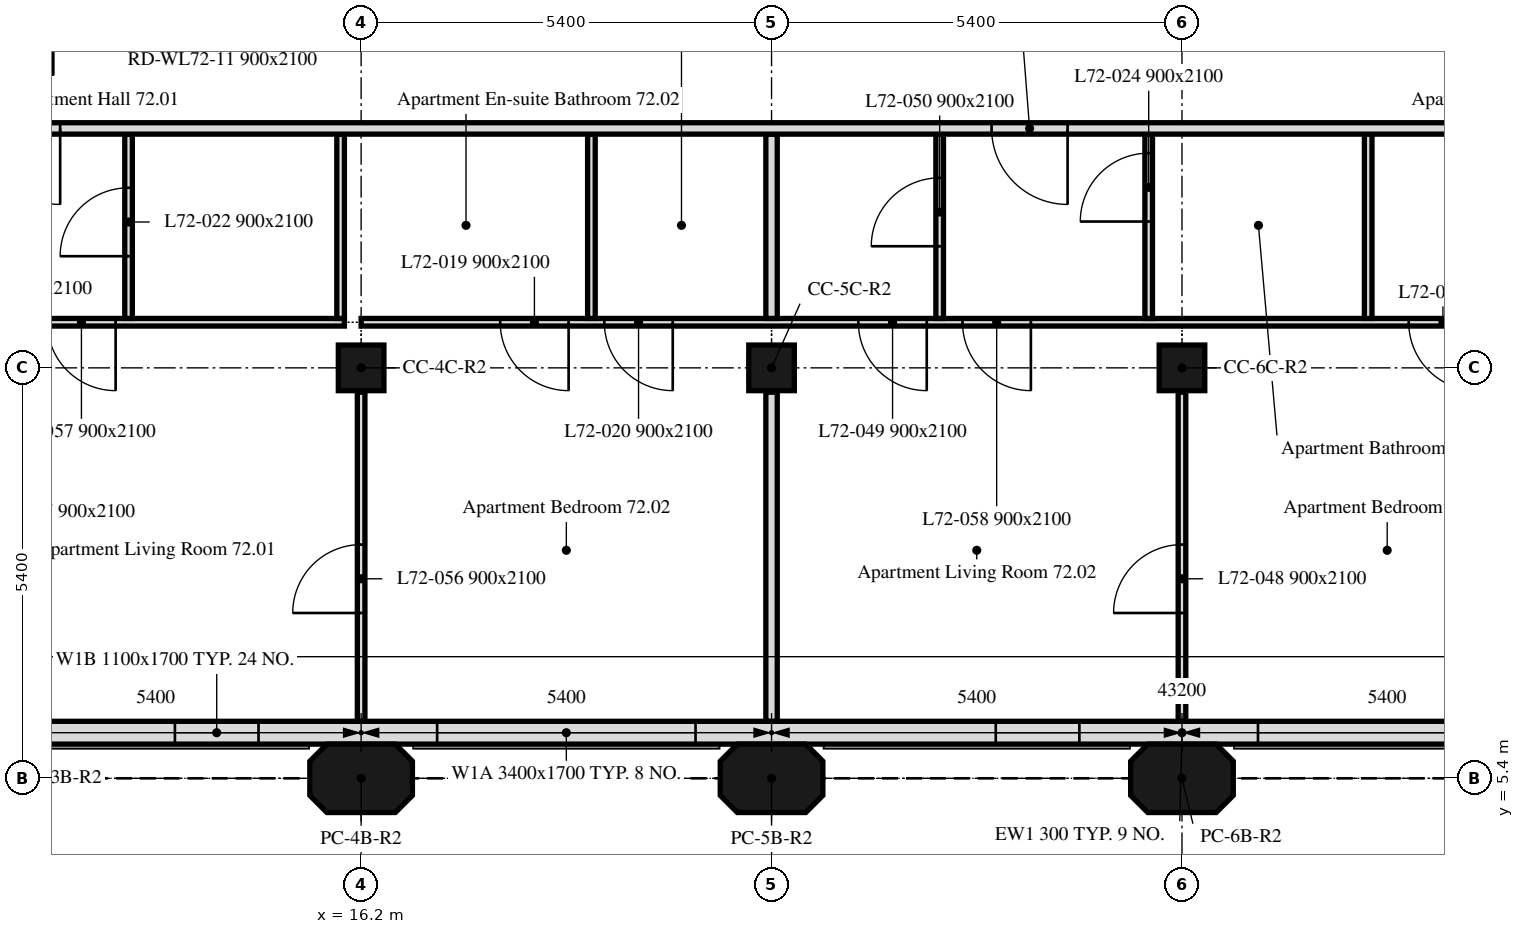
"""IFC4 building model, lengths in metres.
Left out: names, types, materials, properties, quantities, classifications, styles, units other than length and angle.
Written with IfcOpenShell. Run it as: python <this file> out.ifc"""

import sys

from ifc_helpers import new_model, si_unit, direction, frame, frame_2d, origin, origin_2d, place, context, subcontext, project, spatial, polyline, rectangle, outline, extrude, element, fill, save


model = new_model("IFC4")
c1 = context("Model", 3, precision=1e-05, world=origin(), true_north=direction((0.0, 1.0)))
c2 = subcontext(c1, "Body", "Model", "MODEL_VIEW")
j1 = project(units=[si_unit("LENGTHUNIT", "METRE"), si_unit("PLANEANGLEUNIT", "RADIAN")], contexts=[c1])
p1 = place(None, origin())
s1 = spatial("IfcSite", under=j1, at=p1, CompositionType="ELEMENT")
p2 = place(p1, origin())
s2 = spatial("IfcBuilding", under=s1, at=p2, CompositionType="ELEMENT")
p3 = place(p2, frame((0.0, 0.0, 291.7)))
s3 = spatial("IfcBuildingStorey", under=s2, at=p3, CompositionType="ELEMENT", Elevation=291.7)
for number, where, z_axis, x_axis in (
    (1, (16.2, 5.4, 0.0), (0.0, 0.0, 1.0), (1.0, 0.0, 0.0)),
    (2, (21.6, 5.4, 0.0), (0.0, 0.0, 1.0), (1.0, 0.0, 0.0)),
    (3, (27.0, 5.4, 0.0), (0.0, 0.0, 1.0), (1.0, 0.0, 0.0)),
):
    element("IfcColumn", number, at=place(p3, frame(where, z_axis=z_axis, x_axis=x_axis)), inside=s3, PredefinedType="COLUMN", context=c2, shape_type="SweptSolid", body=[
        extrude(outline(polyline([(-0.45, -0.45), (0.45, -0.45), (0.675, -0.225), (0.675, 0.225), (0.45, 0.45), (-0.45, 0.45), (-0.675, 0.225), (-0.675, -0.225), (-0.45, -0.45)])), origin(), (0.0, 0.0, 1.0), 3.0),
    ])
for number, where, z_axis, x_axis in (
    (4, (16.2, 10.8, 0.0), (0.0, 0.0, 1.0), (1.0, 0.0, 0.0)),
    (5, (21.6, 10.8, 0.0), (0.0, 0.0, 1.0), (1.0, 0.0, 0.0)),
    (6, (27.0, 10.8, 0.0), (0.0, 0.0, 1.0), (1.0, 0.0, 0.0)),
):
    element("IfcColumn", number, at=place(p3, frame(where, z_axis=z_axis, x_axis=x_axis)), inside=s3, PredefinedType="COLUMN", context=c2, shape_type="SweptSolid", body=[
        extrude(rectangle(XDim=0.6, YDim=0.6, at=origin_2d()), origin(), (0.0, 0.0, 1.0), 3.0),
    ])
p4 = place(p3, frame((10.986, 6.0, 0.0), z_axis=(0.0, 0.0, 1.0), x_axis=(1.0, 0.0, 0.0)))
e7 = element("IfcWall", 7, at=p4, inside=s3, PredefinedType="SOLIDWALL", context=c2, shape_type="SweptSolid", body=[
    extrude(rectangle(XDim=32.027, YDim=0.3, at=frame_2d((16.014, 0.0))), origin(), (0.0, 0.0, 1.0), 3.0),
])
p5 = place(p4, frame((2.764, 0.0, 0.9)))
e8 = element("IfcOpeningElement", 8, at=p5, cuts=e7, PredefinedType="OPENING", context=c2, shape_type="SweptSolid", body=[
    extrude(rectangle(XDim=1.1, YDim=1.7, at=frame_2d((0.55, 0.85))), frame((0.0, 0.16, 0.0), z_axis=(0.0, -1.0, 0.0), x_axis=(1.0, 0.0, 0.0)), (0.0, 0.0, 1.0), 0.32),
])
p6 = place(p4, frame((6.214, 0.0, 0.9)))
e9 = element("IfcOpeningElement", 9, at=p6, cuts=e7, PredefinedType="OPENING", context=c2, shape_type="SweptSolid", body=[
    extrude(rectangle(XDim=3.4, YDim=1.7, at=frame_2d((1.7, 0.85))), frame((0.0, 0.16, 0.0), z_axis=(0.0, -1.0, 0.0), x_axis=(1.0, 0.0, 0.0)), (0.0, 0.0, 1.0), 0.32),
])
p7 = place(p4, frame((13.564, 0.0, 0.9)))
e10 = element("IfcOpeningElement", 10, at=p7, cuts=e7, PredefinedType="OPENING", context=c2, shape_type="SweptSolid", body=[
    extrude(rectangle(XDim=1.1, YDim=1.7, at=frame_2d((0.55, 0.85))), frame((0.0, 0.16, 0.0), z_axis=(0.0, -1.0, 0.0), x_axis=(1.0, 0.0, 0.0)), (0.0, 0.0, 1.0), 0.32),
])
p8 = place(p4, frame((17.014, 0.0, 0.9)))
e11 = element("IfcOpeningElement", 11, at=p8, cuts=e7, PredefinedType="OPENING", context=c2, shape_type="SweptSolid", body=[
    extrude(rectangle(XDim=3.4, YDim=1.7, at=frame_2d((1.7, 0.85))), frame((0.0, 0.16, 0.0), z_axis=(0.0, -1.0, 0.0), x_axis=(1.0, 0.0, 0.0)), (0.0, 0.0, 1.0), 0.32),
])
p9 = place(p4, frame((24.364, 0.0, 0.9)))
e12 = element("IfcOpeningElement", 12, at=p9, cuts=e7, PredefinedType="OPENING", context=c2, shape_type="SweptSolid", body=[
    extrude(rectangle(XDim=1.1, YDim=1.7, at=frame_2d((0.55, 0.85))), frame((0.0, 0.16, 0.0), z_axis=(0.0, -1.0, 0.0), x_axis=(1.0, 0.0, 0.0)), (0.0, 0.0, 1.0), 0.32),
])
p10 = place(p4, frame((27.814, 0.0, 0.9)))
e13 = element("IfcOpeningElement", 13, at=p10, cuts=e7, PredefinedType="OPENING", context=c2, shape_type="SweptSolid", body=[
    extrude(rectangle(XDim=3.4, YDim=1.7, at=frame_2d((1.7, 0.85))), frame((0.0, 0.16, 0.0), z_axis=(0.0, -1.0, 0.0), x_axis=(1.0, 0.0, 0.0)), (0.0, 0.0, 1.0), 0.32),
])
p11 = place(p3, frame((15.98, 11.4, 0.0), z_axis=(0.0, 0.0, 1.0), x_axis=(-1.0, 0.0, 0.0)))
e14 = element("IfcWall", 14, at=p11, inside=s3, PredefinedType="PARTITIONING", context=c2, shape_type="SweptSolid", body=[
    extrude(rectangle(XDim=9.829, YDim=0.1, at=frame_2d((4.915, 0.0))), origin(), (0.0, 0.0, 1.0), 3.0),
])
p12 = place(p11, frame((7.88, 0.0, 0.0)))
e15 = element("IfcOpeningElement", 15, at=p12, cuts=e14, PredefinedType="OPENING", context=c2, shape_type="SweptSolid", body=[
    extrude(rectangle(XDim=0.9, YDim=2.1, at=frame_2d((0.45, 1.05))), frame((0.0, 0.05, 0.0), z_axis=(0.0, -1.0, 0.0), x_axis=(1.0, 0.0, 0.0)), (0.0, 0.0, 1.0), 0.1),
])
p13 = place(p11, frame((3.01, 0.0, 0.0)))
e16 = element("IfcOpeningElement", 16, at=p13, cuts=e14, PredefinedType="OPENING", context=c2, shape_type="SweptSolid", body=[
    extrude(rectangle(XDim=0.9, YDim=2.1, at=frame_2d((0.45, 1.05))), frame((0.0, 0.05, 0.0), z_axis=(0.0, -1.0, 0.0), x_axis=(1.0, 0.0, 0.0)), (0.0, 0.0, 1.0), 0.1),
])
p14 = place(p3, frame((16.2, 6.151, 0.0), z_axis=(0.0, 0.0, 1.0), x_axis=(0.0, 1.0, 0.0)))
e17 = element("IfcWall", 17, at=p14, inside=s3, PredefinedType="PARTITIONING", context=c2, shape_type="SweptSolid", body=[
    extrude(rectangle(XDim=4.329, YDim=0.1, at=frame_2d((2.165, 0.0))), origin(), (0.0, 0.0, 1.0), 3.0),
])
p15 = place(p14, frame((1.424, 0.0, 0.0)))
e18 = element("IfcOpeningElement", 18, at=p15, cuts=e17, PredefinedType="OPENING", context=c2, shape_type="SweptSolid", body=[
    extrude(rectangle(XDim=0.9, YDim=2.1, at=frame_2d((0.45, 1.05))), frame((0.0, 0.05, 0.0), z_axis=(0.0, -1.0, 0.0), x_axis=(1.0, 0.0, 0.0)), (0.0, 0.0, 1.0), 0.1),
])
p16 = place(p3, frame((21.6, 6.151, 0.0), z_axis=(0.0, 0.0, 1.0), x_axis=(0.0, 1.0, 0.0)))
e19 = element("IfcWall", 19, at=p16, inside=s3, PredefinedType="PARTITIONING", context=c2, shape_type="SweptSolid", body=[
    extrude(rectangle(XDim=4.329, YDim=0.15, at=frame_2d((2.165, 0.0))), origin(), (0.0, 0.0, 1.0), 3.0),
])
p17 = place(p3, frame((37.8, 11.4, 0.0), z_axis=(0.0, 0.0, 1.0), x_axis=(-1.0, 0.0, 0.0)))
e20 = element("IfcWall", 20, at=p17, inside=s3, PredefinedType="PARTITIONING", context=c2, shape_type="SweptSolid", body=[
    extrude(rectangle(XDim=21.6, YDim=0.1, at=frame_2d((10.8, 0.0))), origin(), (0.0, 0.0, 1.0), 3.0),
])
p18 = place(p17, frame((18.87, 0.0, 0.0)))
e21 = element("IfcOpeningElement", 21, at=p18, cuts=e20, PredefinedType="OPENING", context=c2, shape_type="SweptSolid", body=[
    extrude(rectangle(XDim=0.9, YDim=2.1, at=frame_2d((0.45, 1.05))), frame((0.0, 0.05, 0.0), z_axis=(0.0, -1.0, 0.0), x_axis=(1.0, 0.0, 0.0)), (0.0, 0.0, 1.0), 0.1),
])
p19 = place(p17, frame((17.5, 0.0, 0.0)))
e22 = element("IfcOpeningElement", 22, at=p19, cuts=e20, PredefinedType="OPENING", context=c2, shape_type="SweptSolid", body=[
    extrude(rectangle(XDim=0.9, YDim=2.1, at=frame_2d((0.45, 1.05))), frame((0.0, 0.05, 0.0), z_axis=(0.0, -1.0, 0.0), x_axis=(1.0, 0.0, 0.0)), (0.0, 0.0, 1.0), 0.1),
])
p20 = place(p17, frame((6.917, 0.0, 0.0)))
e23 = element("IfcOpeningElement", 23, at=p20, cuts=e20, PredefinedType="OPENING", context=c2, shape_type="SweptSolid", body=[
    extrude(rectangle(XDim=0.9, YDim=2.1, at=frame_2d((0.45, 1.05))), frame((0.0, 0.05, 0.0), z_axis=(0.0, -1.0, 0.0), x_axis=(1.0, 0.0, 0.0)), (0.0, 0.0, 1.0), 0.1),
])
p21 = place(p17, frame((3.15, 0.0, 0.0)))
e24 = element("IfcOpeningElement", 24, at=p21, cuts=e20, PredefinedType="OPENING", context=c2, shape_type="SweptSolid", body=[
    extrude(rectangle(XDim=0.9, YDim=2.1, at=frame_2d((0.45, 1.05))), frame((0.0, 0.05, 0.0), z_axis=(0.0, -1.0, 0.0), x_axis=(1.0, 0.0, 0.0)), (0.0, 0.0, 1.0), 0.1),
])
p22 = place(p17, frame((14.158, 0.0, 0.0)))
e25 = element("IfcOpeningElement", 25, at=p22, cuts=e20, PredefinedType="OPENING", context=c2, shape_type="SweptSolid", body=[
    extrude(rectangle(XDim=0.9, YDim=2.1, at=frame_2d((0.45, 1.05))), frame((0.0, 0.05, 0.0), z_axis=(0.0, -1.0, 0.0), x_axis=(1.0, 0.0, 0.0)), (0.0, 0.0, 1.0), 0.1),
])
p23 = place(p17, frame((12.788, 0.0, 0.0)))
e26 = element("IfcOpeningElement", 26, at=p23, cuts=e20, PredefinedType="OPENING", context=c2, shape_type="SweptSolid", body=[
    extrude(rectangle(XDim=0.9, YDim=2.1, at=frame_2d((0.45, 1.05))), frame((0.0, 0.05, 0.0), z_axis=(0.0, -1.0, 0.0), x_axis=(1.0, 0.0, 0.0)), (0.0, 0.0, 1.0), 0.1),
])
p24 = place(p3, frame((13.14, 11.45, 0.0), z_axis=(0.0, 0.0, 1.0), x_axis=(0.0, 1.0, 0.0)))
e27 = element("IfcWall", 27, at=p24, inside=s3, PredefinedType="PARTITIONING", context=c2, shape_type="SweptSolid", body=[
    extrude(rectangle(XDim=2.425, YDim=0.1, at=frame_2d((1.212, 0.0))), origin(), (0.0, 0.0, 1.0), 3.0),
])
p25 = place(p24, frame((0.819, 0.0, 0.0)))
e28 = element("IfcOpeningElement", 28, at=p25, cuts=e27, PredefinedType="OPENING", context=c2, shape_type="SweptSolid", body=[
    extrude(rectangle(XDim=0.9, YDim=2.1, at=frame_2d((0.45, 1.05))), frame((0.0, 0.05, 0.0), z_axis=(0.0, -1.0, 0.0), x_axis=(1.0, 0.0, 0.0)), (0.0, 0.0, 1.0), 0.1),
])
for number, where, z_axis, x_axis in (
    (29, (15.93, 11.45, 0.0), (0.0, 0.0, 1.0), (0.0, 1.0, 0.0)),
    (30, (19.23, 11.45, 0.0), (0.0, 0.0, 1.0), (0.0, 1.0, 0.0)),
):
    element("IfcWall", number, at=place(p3, frame(where, z_axis=z_axis, x_axis=x_axis)), inside=s3, PredefinedType="PARTITIONING", context=c2, shape_type="SweptSolid", body=[
        extrude(rectangle(XDim=2.425, YDim=0.1, at=frame_2d((1.212, 0.0))), origin(), (0.0, 0.0, 1.0), 3.0),
    ])
p26 = place(p3, frame((21.6, 11.45, 0.0), z_axis=(0.0, 0.0, 1.0), x_axis=(0.0, 1.0, 0.0)))
e31 = element("IfcWall", 31, at=p26, inside=s3, PredefinedType="PARTITIONING", context=c2, shape_type="SweptSolid", body=[
    extrude(rectangle(XDim=2.425, YDim=0.15, at=frame_2d((1.212, 0.0))), origin(), (0.0, 0.0, 1.0), 3.0),
])
p27 = place(p3, frame((27.0, 6.151, 0.0), z_axis=(0.0, 0.0, 1.0), x_axis=(0.0, 1.0, 0.0)))
e32 = element("IfcWall", 32, at=p27, inside=s3, PredefinedType="PARTITIONING", context=c2, shape_type="SweptSolid", body=[
    extrude(rectangle(XDim=4.329, YDim=0.1, at=frame_2d((2.165, 0.0))), origin(), (0.0, 0.0, 1.0), 3.0),
])
p28 = place(p27, frame((1.424, 0.0, 0.0)))
e33 = element("IfcOpeningElement", 33, at=p28, cuts=e32, PredefinedType="OPENING", context=c2, shape_type="SweptSolid", body=[
    extrude(rectangle(XDim=0.9, YDim=2.1, at=frame_2d((0.45, 1.05))), frame((0.0, 0.05, 0.0), z_axis=(0.0, -1.0, 0.0), x_axis=(1.0, 0.0, 0.0)), (0.0, 0.0, 1.0), 0.1),
])
p29 = place(p3, frame((23.812, 11.45, 0.0), z_axis=(0.0, 0.0, 1.0), x_axis=(0.0, 1.0, 0.0)))
e34 = element("IfcWall", 34, at=p29, inside=s3, PredefinedType="PARTITIONING", context=c2, shape_type="SweptSolid", body=[
    extrude(rectangle(XDim=2.425, YDim=0.1, at=frame_2d((1.212, 0.0))), origin(), (0.0, 0.0, 1.0), 3.0),
])
p30 = place(p29, frame((0.95, 0.0, 0.0)))
e35 = element("IfcOpeningElement", 35, at=p30, cuts=e34, PredefinedType="OPENING", context=c2, shape_type="SweptSolid", body=[
    extrude(rectangle(XDim=0.9, YDim=2.1, at=frame_2d((0.45, 1.05))), frame((0.0, 0.05, 0.0), z_axis=(0.0, -1.0, 0.0), x_axis=(1.0, 0.0, 0.0)), (0.0, 0.0, 1.0), 0.1),
])
p31 = place(p3, frame((26.562, 11.45, 0.0), z_axis=(0.0, 0.0, 1.0), x_axis=(0.0, 1.0, 0.0)))
e36 = element("IfcWall", 36, at=p31, inside=s3, PredefinedType="PARTITIONING", context=c2, shape_type="SweptSolid", body=[
    extrude(rectangle(XDim=2.425, YDim=0.1, at=frame_2d((1.212, 0.0))), origin(), (0.0, 0.0, 1.0), 3.0),
])
p32 = place(p31, frame((1.275, 0.0, 0.0)))
e37 = element("IfcOpeningElement", 37, at=p32, cuts=e36, PredefinedType="OPENING", context=c2, shape_type="SweptSolid", body=[
    extrude(rectangle(XDim=0.9, YDim=2.1, at=frame_2d((0.45, 1.05))), frame((0.0, 0.05, 0.0), z_axis=(0.0, -1.0, 0.0), x_axis=(1.0, 0.0, 0.0)), (0.0, 0.0, 1.0), 0.1),
])
p33 = place(p3, frame((29.45, 11.45, 0.0), z_axis=(0.0, 0.0, 1.0), x_axis=(0.0, 1.0, 0.0)))
e38 = element("IfcWall", 38, at=p33, inside=s3, PredefinedType="PARTITIONING", context=c2, shape_type="SweptSolid", body=[
    extrude(rectangle(XDim=2.425, YDim=0.1, at=frame_2d((1.212, 0.0))), origin(), (0.0, 0.0, 1.0), 3.0),
])
p34 = place(p3, frame((47.849, 13.95, 0.0), z_axis=(0.0, 0.0, 1.0), x_axis=(-1.0, 0.0, 0.0)))
e39 = element("IfcWall", 39, at=p34, inside=s3, PredefinedType="PARTITIONING", context=c2, shape_type="SweptSolid", body=[
    extrude(rectangle(XDim=41.698, YDim=0.15, at=frame_2d((20.849, 0.0))), origin(), (0.0, 0.0, 1.0), 3.0),
])
p35 = place(p34, frame((35.609, 0.0, 0.0)))
e40 = element("IfcOpeningElement", 40, at=p35, cuts=e39, PredefinedType="OPENING", context=c2, shape_type="SweptSolid", body=[
    extrude(rectangle(XDim=1.0, YDim=2.1, at=frame_2d((0.5, 1.05))), frame((0.0, 0.075, 0.0), z_axis=(0.0, -1.0, 0.0), x_axis=(1.0, 0.0, 0.0)), (0.0, 0.0, 1.0), 0.15),
])
p36 = place(p34, frame((22.354, 0.0, 0.0)))
e41 = element("IfcOpeningElement", 41, at=p36, cuts=e39, PredefinedType="OPENING", context=c2, shape_type="SweptSolid", body=[
    extrude(rectangle(XDim=1.0, YDim=2.1, at=frame_2d((0.5, 1.05))), frame((0.0, 0.075, 0.0), z_axis=(0.0, -1.0, 0.0), x_axis=(1.0, 0.0, 0.0)), (0.0, 0.0, 1.0), 0.15),
])
p37 = place(p34, frame((8.049, 0.0, 0.0)))
e42 = element("IfcOpeningElement", 42, at=p37, cuts=e39, PredefinedType="OPENING", context=c2, shape_type="SweptSolid", body=[
    extrude(rectangle(XDim=1.0, YDim=2.1, at=frame_2d((0.5, 1.05))), frame((0.0, 0.075, 0.0), z_axis=(0.0, -1.0, 0.0), x_axis=(1.0, 0.0, 0.0)), (0.0, 0.0, 1.0), 0.15),
])
p38 = place(p5, origin())
e43 = element("IfcWindow", 43, at=p38, inside=s3, PartitioningType="SINGLE_PANEL", PredefinedType="WINDOW", context=c2, shape_type="SweptSolid", body=[
    extrude(rectangle(XDim=1.1, YDim=1.7, at=frame_2d((0.55, 0.85))), frame((0.0, 0.03, 0.0), z_axis=(0.0, -1.0, 0.0), x_axis=(1.0, 0.0, 0.0)), (0.0, 0.0, 1.0), 0.06),
])
fill(e8, e43)
p39 = place(p6, origin())
e44 = element("IfcWindow", 44, at=p39, inside=s3, PartitioningType="SINGLE_PANEL", PredefinedType="WINDOW", context=c2, shape_type="SweptSolid", body=[
    extrude(rectangle(XDim=3.4, YDim=1.7, at=frame_2d((1.7, 0.85))), frame((0.0, 0.03, 0.0), z_axis=(0.0, -1.0, 0.0), x_axis=(1.0, 0.0, 0.0)), (0.0, 0.0, 1.0), 0.06),
])
fill(e9, e44)
p40 = place(p7, origin())
e45 = element("IfcWindow", 45, at=p40, inside=s3, PartitioningType="SINGLE_PANEL", PredefinedType="WINDOW", context=c2, shape_type="SweptSolid", body=[
    extrude(rectangle(XDim=1.1, YDim=1.7, at=frame_2d((0.55, 0.85))), frame((0.0, 0.03, 0.0), z_axis=(0.0, -1.0, 0.0), x_axis=(1.0, 0.0, 0.0)), (0.0, 0.0, 1.0), 0.06),
])
fill(e10, e45)
p41 = place(p8, origin())
e46 = element("IfcWindow", 46, at=p41, inside=s3, PartitioningType="SINGLE_PANEL", PredefinedType="WINDOW", context=c2, shape_type="SweptSolid", body=[
    extrude(rectangle(XDim=3.4, YDim=1.7, at=frame_2d((1.7, 0.85))), frame((0.0, 0.03, 0.0), z_axis=(0.0, -1.0, 0.0), x_axis=(1.0, 0.0, 0.0)), (0.0, 0.0, 1.0), 0.06),
])
fill(e11, e46)
p42 = place(p18, origin())
e47 = element("IfcDoor", 47, at=p42, inside=s3, OperationType="SINGLE_SWING_RIGHT", PredefinedType="DOOR", context=c2, shape_type="SweptSolid", body=[
    extrude(rectangle(XDim=0.9, YDim=2.1, at=frame_2d((0.45, 1.05))), frame((0.0, 0.025, 0.0), z_axis=(0.0, -1.0, 0.0), x_axis=(1.0, 0.0, 0.0)), (0.0, 0.0, 1.0), 0.05),
])
fill(e21, e47)
p43 = place(p19, origin())
e48 = element("IfcDoor", 48, at=p43, inside=s3, OperationType="SINGLE_SWING_LEFT", PredefinedType="DOOR", context=c2, shape_type="SweptSolid", body=[
    extrude(rectangle(XDim=0.9, YDim=2.1, at=frame_2d((0.45, 1.05))), frame((0.0, 0.025, 0.0), z_axis=(0.0, -1.0, 0.0), x_axis=(1.0, 0.0, 0.0)), (0.0, 0.0, 1.0), 0.05),
])
fill(e22, e48)
p44 = place(p25, origin())
e49 = element("IfcDoor", 49, at=p44, inside=s3, OperationType="SINGLE_SWING_LEFT", PredefinedType="DOOR", context=c2, shape_type="SweptSolid", body=[
    extrude(rectangle(XDim=0.9, YDim=2.1, at=frame_2d((0.45, 1.05))), frame((0.0, 0.025, 0.0), z_axis=(0.0, -1.0, 0.0), x_axis=(1.0, 0.0, 0.0)), (0.0, 0.0, 1.0), 0.05),
])
fill(e28, e49)
p45 = place(p20, origin())
e50 = element("IfcDoor", 50, at=p45, inside=s3, OperationType="SINGLE_SWING_RIGHT", PredefinedType="DOOR", context=c2, shape_type="SweptSolid", body=[
    extrude(rectangle(XDim=0.9, YDim=2.1, at=frame_2d((0.45, 1.05))), frame((0.0, 0.025, 0.0), z_axis=(0.0, -1.0, 0.0), x_axis=(1.0, 0.0, 0.0)), (0.0, 0.0, 1.0), 0.05),
])
fill(e23, e50)
p46 = place(p32, origin())
e51 = element("IfcDoor", 51, at=p46, inside=s3, OperationType="SINGLE_SWING_LEFT", PredefinedType="DOOR", context=c2, shape_type="SweptSolid", body=[
    extrude(rectangle(XDim=0.9, YDim=2.1, at=frame_2d((0.45, 1.05))), frame((0.0, 0.025, 0.0), z_axis=(0.0, -1.0, 0.0), x_axis=(1.0, 0.0, 0.0)), (0.0, 0.0, 1.0), 0.05),
])
fill(e37, e51)
p47 = place(p28, origin())
e52 = element("IfcDoor", 52, at=p47, inside=s3, OperationType="SINGLE_SWING_LEFT", PredefinedType="DOOR", context=c2, shape_type="SweptSolid", body=[
    extrude(rectangle(XDim=0.9, YDim=2.1, at=frame_2d((0.45, 1.05))), frame((0.0, 0.025, 0.0), z_axis=(0.0, -1.0, 0.0), x_axis=(1.0, 0.0, 0.0)), (0.0, 0.0, 1.0), 0.05),
])
fill(e33, e52)
p48 = place(p22, origin())
e53 = element("IfcDoor", 53, at=p48, inside=s3, OperationType="SINGLE_SWING_LEFT", PredefinedType="DOOR", context=c2, shape_type="SweptSolid", body=[
    extrude(rectangle(XDim=0.9, YDim=2.1, at=frame_2d((0.45, 1.05))), frame((0.0, 0.025, 0.0), z_axis=(0.0, -1.0, 0.0), x_axis=(1.0, 0.0, 0.0)), (0.0, 0.0, 1.0), 0.05),
])
fill(e25, e53)
p49 = place(p30, origin())
e54 = element("IfcDoor", 54, at=p49, inside=s3, OperationType="SINGLE_SWING_LEFT", PredefinedType="DOOR", context=c2, shape_type="SweptSolid", body=[
    extrude(rectangle(XDim=0.9, YDim=2.1, at=frame_2d((0.45, 1.05))), frame((0.0, 0.025, 0.0), z_axis=(0.0, -1.0, 0.0), x_axis=(1.0, 0.0, 0.0)), (0.0, 0.0, 1.0), 0.05),
])
fill(e35, e54)
p50 = place(p15, origin())
e55 = element("IfcDoor", 55, at=p50, inside=s3, OperationType="SINGLE_SWING_RIGHT", PredefinedType="DOOR", context=c2, shape_type="SweptSolid", body=[
    extrude(rectangle(XDim=0.9, YDim=2.1, at=frame_2d((0.45, 1.05))), frame((0.0, 0.025, 0.0), z_axis=(0.0, -1.0, 0.0), x_axis=(1.0, 0.0, 0.0)), (0.0, 0.0, 1.0), 0.05),
])
fill(e18, e55)
p51 = place(p13, origin())
e56 = element("IfcDoor", 56, at=p51, inside=s3, OperationType="SINGLE_SWING_LEFT", PredefinedType="DOOR", context=c2, shape_type="SweptSolid", body=[
    extrude(rectangle(XDim=0.9, YDim=2.1, at=frame_2d((0.45, 1.05))), frame((0.0, 0.025, 0.0), z_axis=(0.0, -1.0, 0.0), x_axis=(1.0, 0.0, 0.0)), (0.0, 0.0, 1.0), 0.05),
])
fill(e16, e56)
p52 = place(p23, origin())
e57 = element("IfcDoor", 57, at=p52, inside=s3, OperationType="SINGLE_SWING_RIGHT", PredefinedType="DOOR", context=c2, shape_type="SweptSolid", body=[
    extrude(rectangle(XDim=0.9, YDim=2.1, at=frame_2d((0.45, 1.05))), frame((0.0, 0.025, 0.0), z_axis=(0.0, -1.0, 0.0), x_axis=(1.0, 0.0, 0.0)), (0.0, 0.0, 1.0), 0.05),
])
fill(e26, e57)
p53 = place(p35, origin())
e58 = element("IfcDoor", 58, at=p53, inside=s3, OperationType="SINGLE_SWING_RIGHT", PredefinedType="DOOR", context=c2, shape_type="SweptSolid", body=[
    extrude(rectangle(XDim=1.0, YDim=2.1, at=frame_2d((0.5, 1.05))), frame((0.0, 0.025, 0.0), z_axis=(0.0, -1.0, 0.0), x_axis=(1.0, 0.0, 0.0)), (0.0, 0.0, 1.0), 0.05),
])
fill(e40, e58)
p54 = place(p36, origin())
e59 = element("IfcDoor", 59, at=p54, inside=s3, OperationType="SINGLE_SWING_LEFT", PredefinedType="DOOR", context=c2, shape_type="SweptSolid", body=[
    extrude(rectangle(XDim=1.0, YDim=2.1, at=frame_2d((0.5, 1.05))), frame((0.0, 0.025, 0.0), z_axis=(0.0, -1.0, 0.0), x_axis=(1.0, 0.0, 0.0)), (0.0, 0.0, 1.0), 0.05),
])
fill(e41, e59)
save(model, sys.argv[1])
